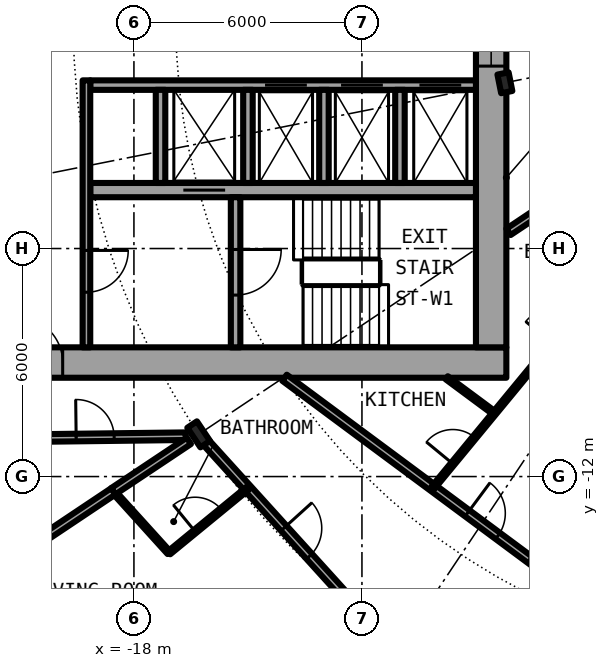
"""IFC4 building model, lengths in metres.
Left out: names, types, materials, properties, quantities, classifications, styles, units other than length and angle.
Written with IfcOpenShell. Run it as: python <this file> out.ifc"""

import sys

from ifc_helpers import new_model, si_unit, direction, frame, frame_2d, origin, origin_2d, place, context, subcontext, project, spatial, rectangle, i_section, extrude, element, fill, save


model = new_model("IFC4")
c1 = context("Model", 3, precision=1e-05, world=origin(), true_north=direction((0.0, 1.0)))
c2 = subcontext(c1, "Body", "Model", "MODEL_VIEW")
j1 = project(units=[si_unit("LENGTHUNIT", "METRE"), si_unit("PLANEANGLEUNIT", "RADIAN")], contexts=[c1])
p1 = place(None, origin())
s1 = spatial("IfcSite", under=j1, at=p1, CompositionType="ELEMENT")
p2 = place(p1, origin())
s2 = spatial("IfcBuilding", under=s1, at=p2, CompositionType="ELEMENT")
p3 = place(p2, frame((0.0, 0.0, 50.25)))
s3 = spatial("IfcBuildingStorey", under=s2, at=p3, CompositionType="ELEMENT", Elevation=50.25)
p4 = place(p3, frame((-16.297, -10.889, 0.0), z_axis=(0.0, 0.0, 1.0), x_axis=(-0.831469612303, -0.55557023302, 0.0)))
e1 = element("IfcColumn", 1, at=p4, inside=s3, PredefinedType="COLUMN", context=c2, shape_type="SweptSolid", body=[
    extrude(i_section(OverallWidth=0.305, OverallDepth=0.62, WebThickness=0.021, FlangeThickness=0.04, FilletRadius=0.027, at=origin_2d()), origin(), (0.0, 0.0, 1.0), 3.05),
])
p5 = place(p3, frame((-8.239, -1.639, 0.0), z_axis=(0.0, 0.0, 1.0), x_axis=(-0.980785280403, -0.195090322016, 0.0)))
e2 = element("IfcColumn", 2, at=p5, inside=s3, PredefinedType="COLUMN", context=c2, shape_type="SweptSolid", body=[
    extrude(i_section(OverallWidth=0.3, OverallDepth=0.5, WebThickness=0.014, FlangeThickness=0.028, FilletRadius=0.027, at=origin_2d()), origin(), (0.0, 0.0, 1.0), 3.05),
])
p6 = place(p3, frame((-22.4, -9.0, 0.0), z_axis=(0.0, 0.0, 1.0), x_axis=(1.0, 0.0, 0.0)))
e3 = element("IfcWall", 3, at=p6, inside=s3, PredefinedType="SHEAR", context=c2, shape_type="SweptSolid", body=[
    extrude(rectangle(XDim=14.2, YDim=0.8, at=frame_2d((7.1, 0.0))), origin(), (0.0, 0.0, 1.0), 3.05),
])
p7 = place(p6, frame((1.325, 0.0, 0.0)))
e4 = element("IfcOpeningElement", 4, at=p7, cuts=e3, PredefinedType="OPENING", context=c2, shape_type="SweptSolid", body=[
    extrude(rectangle(XDim=1.2, YDim=2.3, at=frame_2d((0.6, 1.15))), frame((0.0, 0.41, 0.0), z_axis=(0.0, -1.0, 0.0), x_axis=(1.0, 0.0, 0.0)), (0.0, 0.0, 1.0), 0.82),
])
p8 = place(p3, frame((-8.6, 8.6, 0.0), z_axis=(0.0, 0.0, 1.0), x_axis=(0.0, -1.0, 0.0)))
e5 = element("IfcWall", 5, at=p8, inside=s3, PredefinedType="SHEAR", context=c2, shape_type="SweptSolid", body=[
    extrude(rectangle(XDim=17.2, YDim=0.8, at=frame_2d((8.6, 0.0))), origin(), (0.0, 0.0, 1.0), 3.05),
])
p9 = place(p8, frame((7.4, 0.0, 0.1)))
e6 = element("IfcOpeningElement", 6, at=p9, cuts=e5, PredefinedType="OPENING", context=c2, shape_type="SweptSolid", body=[
    extrude(rectangle(XDim=2.4, YDim=2.2, at=frame_2d((1.2, 1.1))), frame((0.0, 0.41, 0.0), z_axis=(0.0, -1.0, 0.0), x_axis=(1.0, 0.0, 0.0)), (0.0, 0.0, 1.0), 0.82),
])
p10 = place(p3, frame((-9.0, -1.7, 0.0), z_axis=(0.0, 0.0, 1.0), x_axis=(-1.0, 0.0, 0.0)))
e7 = element("IfcWall", 7, at=p10, inside=s3, PredefinedType="SHEAR", context=c2, shape_type="SweptSolid", body=[
    extrude(rectangle(XDim=10.15, YDim=0.25, at=frame_2d((5.075, 0.0))), origin(), (0.0, 0.0, 1.0), 3.05),
])
p11 = place(p10, frame((0.387, 0.0, 0.0)))
e8 = element("IfcOpeningElement", 8, at=p11, cuts=e7, PredefinedType="OPENING", context=c2, shape_type="SweptSolid", body=[
    extrude(rectangle(XDim=1.1, YDim=2.3, at=frame_2d((0.55, 1.15))), frame((0.0, 0.135, 0.0), z_axis=(0.0, -1.0, 0.0), x_axis=(1.0, 0.0, 0.0)), (0.0, 0.0, 1.0), 0.27),
])
p12 = place(p10, frame((2.45, 0.0, 0.0)))
e9 = element("IfcOpeningElement", 9, at=p12, cuts=e7, PredefinedType="OPENING", context=c2, shape_type="SweptSolid", body=[
    extrude(rectangle(XDim=1.1, YDim=2.3, at=frame_2d((0.55, 1.15))), frame((0.0, 0.135, 0.0), z_axis=(0.0, -1.0, 0.0), x_axis=(1.0, 0.0, 0.0)), (0.0, 0.0, 1.0), 0.27),
])
p13 = place(p10, frame((4.45, 0.0, 0.0)))
e10 = element("IfcOpeningElement", 10, at=p13, cuts=e7, PredefinedType="OPENING", context=c2, shape_type="SweptSolid", body=[
    extrude(rectangle(XDim=1.1, YDim=2.3, at=frame_2d((0.55, 1.15))), frame((0.0, 0.135, 0.0), z_axis=(0.0, -1.0, 0.0), x_axis=(1.0, 0.0, 0.0)), (0.0, 0.0, 1.0), 0.27),
])
p14 = place(p3, frame((-9.0, -4.462, 0.0), z_axis=(0.0, 0.0, 1.0), x_axis=(-1.0, 0.0, 0.0)))
e11 = element("IfcWall", 11, at=p14, inside=s3, PredefinedType="SHEAR", context=c2, shape_type="SweptSolid", body=[
    extrude(rectangle(XDim=10.15, YDim=0.375, at=frame_2d((5.075, 0.0))), origin(), (0.0, 0.0, 1.0), 3.05),
])
p15 = place(p14, frame((6.6, 0.0, 0.0)))
e12 = element("IfcOpeningElement", 12, at=p15, cuts=e11, PredefinedType="OPENING", context=c2, shape_type="SweptSolid", body=[
    extrude(rectangle(XDim=1.1, YDim=2.3, at=frame_2d((0.55, 1.15))), frame((0.0, 0.198, 0.0), z_axis=(0.0, -1.0, 0.0), x_axis=(1.0, 0.0, 0.0)), (0.0, 0.0, 1.0), 0.395),
])
p16 = place(p3, frame((-15.325, -4.65, 0.0), z_axis=(0.0, 0.0, 1.0), x_axis=(0.0, -1.0, 0.0)))
e13 = element("IfcWall", 13, at=p16, inside=s3, PredefinedType="SHEAR", context=c2, shape_type="SweptSolid", body=[
    extrude(rectangle(XDim=3.95, YDim=0.25, at=frame_2d((1.975, 0.0))), origin(), (0.0, 0.0, 1.0), 3.05),
])
p17 = place(p16, frame((1.375, 0.0, 0.0)))
e14 = element("IfcOpeningElement", 14, at=p17, cuts=e13, PredefinedType="OPENING", context=c2, shape_type="SweptSolid", body=[
    extrude(rectangle(XDim=1.2, YDim=2.3, at=frame_2d((0.6, 1.15))), frame((0.0, 0.135, 0.0), z_axis=(0.0, -1.0, 0.0), x_axis=(1.0, 0.0, 0.0)), (0.0, 0.0, 1.0), 0.27),
])
for number, where, z_axis, x_axis in (
    (15, (-15.0, -1.825, 0.0), (0.0, 0.0, 1.0), (0.0, -1.0, 0.0)),
    (16, (-17.3, -1.825, 0.0), (0.0, 0.0, 1.0), (0.0, -1.0, 0.0)),
):
    element("IfcWall", number, at=place(p3, frame(where, z_axis=z_axis, x_axis=x_axis)), inside=s3, PredefinedType="SOLIDWALL", context=c2, shape_type="SweptSolid", body=[
        extrude(rectangle(XDim=2.45, YDim=0.25, at=frame_2d((1.225, 0.0))), origin(), (0.0, 0.0, 1.0), 2.7),
    ])
p18 = place(p3, frame((-19.25, -1.575, 0.0), z_axis=(0.0, 0.0, 1.0), x_axis=(0.0, -1.0, 0.0)))
e17 = element("IfcWall", 17, at=p18, inside=s3, PredefinedType="SOLIDWALL", context=c2, shape_type="SweptSolid", body=[
    extrude(rectangle(XDim=7.025, YDim=0.2, at=frame_2d((3.513, 0.0))), origin(), (0.0, 0.0, 1.0), 2.7),
])
p19 = place(p18, frame((4.475, 0.0, 0.0)))
e18 = element("IfcOpeningElement", 18, at=p19, cuts=e17, PredefinedType="OPENING", context=c2, shape_type="SweptSolid", body=[
    extrude(rectangle(XDim=1.1, YDim=2.3, at=frame_2d((0.55, 1.15))), frame((0.0, 0.11, 0.0), z_axis=(0.0, -1.0, 0.0), x_axis=(1.0, 0.0, 0.0)), (0.0, 0.0, 1.0), 0.22),
])
for number, where, z_axis, x_axis in (
    (19, (-11.0, -1.825, 0.0), (0.0, 0.0, 1.0), (0.0, -1.0, 0.0)),
    (20, (-13.0, -1.825, 0.0), (0.0, 0.0, 1.0), (0.0, -1.0, 0.0)),
):
    element("IfcWall", number, at=place(p3, frame(where, z_axis=z_axis, x_axis=x_axis)), inside=s3, PredefinedType="SOLIDWALL", context=c2, shape_type="SweptSolid", body=[
        extrude(rectangle(XDim=2.45, YDim=0.25, at=frame_2d((1.225, 0.0))), origin(), (0.0, 0.0, 1.0), 2.7),
    ])
p20 = place(p3, frame((-18.542, -12.389, 0.0), z_axis=(0.0, 0.0, 1.0), x_axis=(0.671396556615, -0.741098282123, 0.0)))
e21 = element("IfcWall", 21, at=p20, inside=s3, PredefinedType="PARTITIONING", context=c2, shape_type="SweptSolid", body=[
    extrude(rectangle(XDim=2.182, YDim=0.1, at=frame_2d((1.091, 0.0))), origin(), (0.0, 0.0, 1.0), 2.7),
])
p21 = place(p3, frame((-16.193, -11.003, 0.0), z_axis=(0.0, 0.0, 1.0), x_axis=(0.671514934772, -0.740991020444, 0.0)))
e22 = element("IfcWall", 22, at=p21, inside=s3, PredefinedType="PARTITIONING", context=c2, shape_type="SweptSolid", body=[
    extrude(rectangle(XDim=5.598, YDim=0.2, at=frame_2d((2.799, 0.0))), origin(), (0.0, 0.0, 1.0), 2.38),
])
p22 = place(p21, frame((3.18, 0.0, 0.0)))
e23 = element("IfcOpeningElement", 23, at=p22, cuts=e22, PredefinedType="OPENING", context=c2, shape_type="SweptSolid", body=[
    extrude(rectangle(XDim=1.0, YDim=2.3, at=frame_2d((0.5, 1.15))), frame((0.0, 0.11, 0.0), z_axis=(0.0, -1.0, 0.0), x_axis=(1.0, 0.0, 0.0)), (0.0, 0.0, 1.0), 0.22),
])
p23 = place(p3, frame((-14.037, -9.4, 0.0), z_axis=(0.0, 0.0, 1.0), x_axis=(0.803202106898, -0.595706618626, 0.0)))
e24 = element("IfcWall", 24, at=p23, inside=s3, PredefinedType="PARTITIONING", context=c2, shape_type="SweptSolid", body=[
    extrude(rectangle(XDim=11.368, YDim=0.2, at=frame_2d((5.684, 0.0))), origin(), (0.0, 0.0, 1.0), 2.7),
])
p24 = place(p23, frame((5.988, 0.0, 0.0)))
e25 = element("IfcOpeningElement", 25, at=p24, cuts=e24, PredefinedType="OPENING", context=c2, shape_type="SweptSolid", body=[
    extrude(rectangle(XDim=1.0, YDim=2.3, at=frame_2d((0.5, 1.15))), frame((0.0, 0.11, 0.0), z_axis=(0.0, -1.0, 0.0), x_axis=(1.0, 0.0, 0.0)), (0.0, 0.0, 1.0), 0.22),
])
p25 = place(p3, frame((-9.77, -9.4, 0.0), z_axis=(0.0, 0.0, 1.0), x_axis=(0.803264156882, -0.595622946392, 0.0)))
e26 = element("IfcWall", 26, at=p25, inside=s3, PredefinedType="PARTITIONING", context=c2, shape_type="SweptSolid", body=[
    extrude(rectangle(XDim=1.565, YDim=0.1, at=frame_2d((0.782, 0.0))), origin(), (0.0, 0.0, 1.0), 2.7),
])
p26 = place(p3, frame((-21.675, -11.0, 0.0), z_axis=(0.0, 0.0, 1.0), x_axis=(0.99992425795, 0.012307654658, 0.0)))
e27 = element("IfcWall", 27, at=p26, inside=s3, PredefinedType="PARTITIONING", context=c2, shape_type="SweptSolid", body=[
    extrude(rectangle(XDim=5.039, YDim=0.2, at=frame_2d((2.519, 0.0))), origin(), (0.0, 0.0, 1.0), 2.7),
])
p27 = place(p26, frame((2.155, 0.0, 0.0)))
e28 = element("IfcOpeningElement", 28, at=p27, cuts=e27, PredefinedType="OPENING", context=c2, shape_type="SweptSolid", body=[
    extrude(rectangle(XDim=1.0, YDim=2.3, at=frame_2d((0.5, 1.15))), frame((0.0, 0.11, 0.0), z_axis=(0.0, -1.0, 0.0), x_axis=(1.0, 0.0, 0.0)), (0.0, 0.0, 1.0), 0.22),
])
p28 = place(p3, frame((-6.513, -4.472, 0.0), z_axis=(0.0, 0.0, 1.0), x_axis=(-0.831417956244, -0.555647533996, 0.0)))
e29 = element("IfcWall", 29, at=p28, inside=s3, PredefinedType="PARTITIONING", context=c2, shape_type="SweptSolid", body=[
    extrude(rectangle(XDim=1.962, YDim=0.2, at=frame_2d((0.981, 0.0))), origin(), (0.0, 0.0, 1.0), 2.7),
])
p29 = place(p3, frame((-18.544, -12.387, 0.0), z_axis=(0.0, 0.0, 1.0), x_axis=(0.832066006555, 0.554676627176, 0.0)))
e30 = element("IfcWall", 30, at=p29, inside=s3, PredefinedType="PARTITIONING", context=c2, shape_type="SweptSolid", body=[
    extrude(rectangle(XDim=2.39, YDim=0.2, at=frame_2d((1.195, 0.0))), origin(), (0.0, 0.0, 1.0), 2.7),
])
p30 = place(p3, frame((-22.595, -15.098, 0.0), z_axis=(0.0, 0.0, 1.0), x_axis=(0.831387096605, 0.55569370664, 0.0)))
e31 = element("IfcWall", 31, at=p30, inside=s3, PredefinedType="PARTITIONING", context=c2, shape_type="SweptSolid", body=[
    extrude(rectangle(XDim=4.875, YDim=0.2, at=frame_2d((2.438, 0.0))), origin(), (0.0, 0.0, 1.0), 2.7),
])
p31 = place(p3, frame((-17.077, -14.006, 0.0), z_axis=(0.0, 0.0, 1.0), x_axis=(0.77319617123, 0.634166918717, 0.0)))
e32 = element("IfcWall", 32, at=p31, inside=s3, PredefinedType="PARTITIONING", context=c2, shape_type="SweptSolid", body=[
    extrude(rectangle(XDim=2.675, YDim=0.1, at=frame_2d((1.337, 0.0))), origin(), (0.0, 0.0, 1.0), 2.7),
])
p32 = place(p31, frame((0.887, 0.0, 0.0)))
e33 = element("IfcOpeningElement", 33, at=p32, cuts=e32, PredefinedType="OPENING", context=c2, shape_type="SweptSolid", body=[
    extrude(rectangle(XDim=0.9, YDim=2.3, at=frame_2d((0.45, 1.15))), frame((0.0, 0.06, 0.0), z_axis=(0.0, -1.0, 0.0), x_axis=(1.0, 0.0, 0.0)), (0.0, 0.0, 1.0), 0.12),
])
p33 = place(p3, frame((-10.132, -12.296, 0.0), z_axis=(0.0, 0.0, 1.0), x_axis=(0.636105207978, 0.771602335652, 0.0)))
e34 = element("IfcWall", 34, at=p33, inside=s3, PredefinedType="PARTITIONING", context=c2, shape_type="SweptSolid", body=[
    extrude(rectangle(XDim=8.213, YDim=0.1, at=frame_2d((4.106, 0.0))), origin(), (0.0, 0.0, 1.0), 2.7),
])
p34 = place(p33, frame((0.821, 0.0, 0.0)))
e35 = element("IfcOpeningElement", 35, at=p34, cuts=e34, PredefinedType="OPENING", context=c2, shape_type="SweptSolid", body=[
    extrude(rectangle(XDim=0.9, YDim=2.3, at=frame_2d((0.45, 1.15))), frame((0.0, 0.06, 0.0), z_axis=(0.0, -1.0, 0.0), x_axis=(1.0, 0.0, 0.0)), (0.0, 0.0, 1.0), 0.12),
])
p35 = place(p33, frame((4.929, 0.0, 0.0)))
e36 = element("IfcOpeningElement", 36, at=p35, cuts=e34, PredefinedType="OPENING", context=c2, shape_type="SweptSolid", body=[
    extrude(rectangle(XDim=0.9, YDim=2.3, at=frame_2d((0.45, 1.15))), frame((0.0, 0.06, 0.0), z_axis=(0.0, -1.0, 0.0), x_axis=(1.0, 0.0, 0.0)), (0.0, 0.0, 1.0), 0.12),
])
p36 = place(p11, origin())
e37 = element("IfcDoor", 37, at=p36, inside=s3, OperationType="DOUBLE_DOOR_SLIDING", PredefinedType="DOOR", context=c2, shape_type="SweptSolid", body=[
    extrude(rectangle(XDim=1.1, YDim=2.3, at=frame_2d((0.55, 1.15))), frame((0.0, 0.025, 0.0), z_axis=(0.0, -1.0, 0.0), x_axis=(1.0, 0.0, 0.0)), (0.0, 0.0, 1.0), 0.05),
])
fill(e8, e37)
p37 = place(p12, origin())
e38 = element("IfcDoor", 38, at=p37, inside=s3, OperationType="DOUBLE_DOOR_SLIDING", PredefinedType="DOOR", context=c2, shape_type="SweptSolid", body=[
    extrude(rectangle(XDim=1.1, YDim=2.3, at=frame_2d((0.55, 1.15))), frame((0.0, 0.025, 0.0), z_axis=(0.0, -1.0, 0.0), x_axis=(1.0, 0.0, 0.0)), (0.0, 0.0, 1.0), 0.05),
])
fill(e9, e38)
p38 = place(p13, origin())
e39 = element("IfcDoor", 39, at=p38, inside=s3, OperationType="DOUBLE_DOOR_SLIDING", PredefinedType="DOOR", context=c2, shape_type="SweptSolid", body=[
    extrude(rectangle(XDim=1.1, YDim=2.3, at=frame_2d((0.55, 1.15))), frame((0.0, 0.025, 0.0), z_axis=(0.0, -1.0, 0.0), x_axis=(1.0, 0.0, 0.0)), (0.0, 0.0, 1.0), 0.05),
])
fill(e10, e39)
p39 = place(p15, origin())
e40 = element("IfcDoor", 40, at=p39, inside=s3, OperationType="DOUBLE_DOOR_SLIDING", PredefinedType="DOOR", context=c2, shape_type="SweptSolid", body=[
    extrude(rectangle(XDim=1.1, YDim=2.3, at=frame_2d((0.55, 1.15))), frame((0.0, 0.025, 0.0), z_axis=(0.0, -1.0, 0.0), x_axis=(1.0, 0.0, 0.0)), (0.0, 0.0, 1.0), 0.05),
])
fill(e12, e40)
p40 = place(p17, origin())
e41 = element("IfcDoor", 41, at=p40, inside=s3, OperationType="SINGLE_SWING_LEFT", PredefinedType="DOOR", context=c2, shape_type="SweptSolid", body=[
    extrude(rectangle(XDim=1.2, YDim=2.3, at=frame_2d((0.6, 1.15))), frame((0.0, 0.025, 0.0), z_axis=(0.0, -1.0, 0.0), x_axis=(1.0, 0.0, 0.0)), (0.0, 0.0, 1.0), 0.05),
])
fill(e14, e41)
p41 = place(p19, origin())
e42 = element("IfcDoor", 42, at=p41, inside=s3, OperationType="SINGLE_SWING_LEFT", PredefinedType="DOOR", context=c2, shape_type="SweptSolid", body=[
    extrude(rectangle(XDim=1.1, YDim=2.3, at=frame_2d((0.55, 1.15))), frame((0.0, 0.025, 0.0), z_axis=(0.0, -1.0, 0.0), x_axis=(1.0, 0.0, 0.0)), (0.0, 0.0, 1.0), 0.05),
])
fill(e18, e42)
p42 = place(p7, origin())
e43 = element("IfcDoor", 43, at=p42, inside=s3, OperationType="SINGLE_SWING_RIGHT", PredefinedType="DOOR", context=c2, shape_type="SweptSolid", body=[
    extrude(rectangle(XDim=1.2, YDim=2.3, at=frame_2d((0.6, 1.15))), frame((0.0, 0.025, 0.0), z_axis=(0.0, -1.0, 0.0), x_axis=(1.0, 0.0, 0.0)), (0.0, 0.0, 1.0), 0.05),
])
fill(e4, e43)
p43 = place(p9, origin())
e44 = element("IfcWindow", 44, at=p43, inside=s3, PartitioningType="SINGLE_PANEL", PredefinedType="WINDOW", context=c2, shape_type="SweptSolid", body=[
    extrude(rectangle(XDim=2.4, YDim=2.2, at=frame_2d((1.2, 1.1))), frame((0.0, 0.03, 0.0), z_axis=(0.0, -1.0, 0.0), x_axis=(1.0, 0.0, 0.0)), (0.0, 0.0, 1.0), 0.06),
])
fill(e6, e44)
p44 = place(p22, origin())
e45 = element("IfcDoor", 45, at=p44, inside=s3, OperationType="SINGLE_SWING_RIGHT", PredefinedType="DOOR", context=c2, shape_type="SweptSolid", body=[
    extrude(rectangle(XDim=1.0, YDim=2.3, at=frame_2d((0.5, 1.15))), frame((0.0, 0.025, 0.0), z_axis=(0.0, -1.0, 0.0), x_axis=(1.0, 0.0, 0.0)), (0.0, 0.0, 1.0), 0.05),
])
fill(e23, e45)
p45 = place(p32, origin())
e46 = element("IfcDoor", 46, at=p45, inside=s3, OperationType="SINGLE_SWING_LEFT", PredefinedType="DOOR", context=c2, shape_type="SweptSolid", body=[
    extrude(rectangle(XDim=0.9, YDim=2.3, at=frame_2d((0.45, 1.15))), frame((0.0, 0.025, 0.0), z_axis=(0.0, -1.0, 0.0), x_axis=(1.0, 0.0, 0.0)), (0.0, 0.0, 1.0), 0.05),
])
fill(e33, e46)
p46 = place(p24, origin())
e47 = element("IfcDoor", 47, at=p46, inside=s3, OperationType="SINGLE_SWING_RIGHT", PredefinedType="DOOR", context=c2, shape_type="SweptSolid", body=[
    extrude(rectangle(XDim=1.0, YDim=2.3, at=frame_2d((0.5, 1.15))), frame((0.0, 0.025, 0.0), z_axis=(0.0, -1.0, 0.0), x_axis=(1.0, 0.0, 0.0)), (0.0, 0.0, 1.0), 0.05),
])
fill(e25, e47)
p47 = place(p34, origin())
e48 = element("IfcDoor", 48, at=p47, inside=s3, OperationType="SINGLE_SWING_LEFT", PredefinedType="DOOR", context=c2, shape_type="SweptSolid", body=[
    extrude(rectangle(XDim=0.9, YDim=2.3, at=frame_2d((0.45, 1.15))), frame((0.0, 0.025, 0.0), z_axis=(0.0, -1.0, 0.0), x_axis=(1.0, 0.0, 0.0)), (0.0, 0.0, 1.0), 0.05),
])
fill(e35, e48)
p48 = place(p27, origin())
e49 = element("IfcDoor", 49, at=p48, inside=s3, OperationType="SINGLE_SWING_RIGHT", PredefinedType="DOOR", context=c2, shape_type="SweptSolid", body=[
    extrude(rectangle(XDim=1.0, YDim=2.3, at=frame_2d((0.5, 1.15))), frame((0.0, 0.025, 0.0), z_axis=(0.0, -1.0, 0.0), x_axis=(1.0, 0.0, 0.0)), (0.0, 0.0, 1.0), 0.05),
])
fill(e28, e49)
save(model, sys.argv[1])
